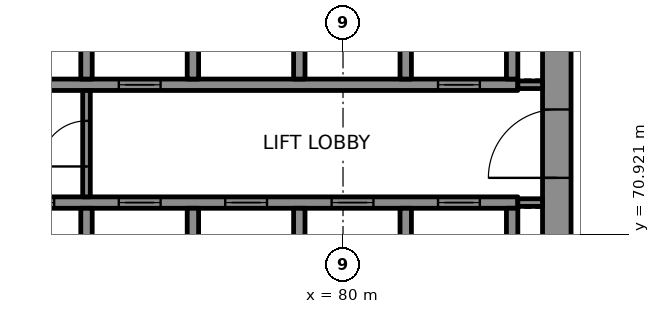
"""IFC4 building model, lengths in metres.
Left out: names, types, materials, properties, quantities, classifications, styles, units other than length and angle.
Written with IfcOpenShell. Run it as: python <this file> out.ifc"""

import sys

from ifc_helpers import new_model, si_unit, direction, frame, frame_2d, origin, place, context, subcontext, project, spatial, rectangle, extrude, element, fill, save


model = new_model("IFC4")
c1 = context("Model", 3, precision=1e-05, world=origin(), true_north=direction((0.0, 1.0)))
c2 = subcontext(c1, "Body", "Model", "MODEL_VIEW")
j1 = project(units=[si_unit("LENGTHUNIT", "METRE"), si_unit("PLANEANGLEUNIT", "RADIAN")], contexts=[c1])
p1 = place(None, origin())
s1 = spatial("IfcSite", under=j1, at=p1, CompositionType="ELEMENT")
p2 = place(p1, origin())
s2 = spatial("IfcBuilding", under=s1, at=p2, CompositionType="ELEMENT")
p3 = place(p2, frame((0.0, 0.0, 214.3)))
s3 = spatial("IfcBuildingStorey", under=s2, at=p3, CompositionType="ELEMENT", Elevation=214.3)
p4 = place(p3, frame((85.625, 67.75, 0.0), z_axis=(0.0, 0.0, 1.0), x_axis=(0.0, 1.0, 0.0)))
e1 = element("IfcWall", 1, at=p4, inside=s3, PredefinedType="SHEAR", context=c2, shape_type="SweptSolid", body=[
    extrude(rectangle(XDim=14.5, YDim=0.75, at=frame_2d((7.25, 0.0))), origin(), (0.0, 0.0, 1.0), 3.7),
])
p5 = place(p4, frame((4.65, 0.0, 0.0)))
e2 = element("IfcOpeningElement", 2, at=p5, cuts=e1, PredefinedType="OPENING", context=c2, shape_type="SweptSolid", body=[
    extrude(rectangle(XDim=1.8, YDim=2.1, at=frame_2d((0.9, 1.05))), frame((0.0, 0.385, 0.0), z_axis=(0.0, -1.0, 0.0), x_axis=(1.0, 0.0, 0.0)), (0.0, 0.0, 1.0), 0.77),
])
p6 = place(p4, frame((11.8, 0.0, 0.0)))
e3 = element("IfcOpeningElement", 3, at=p6, cuts=e1, PredefinedType="OPENING", context=c2, shape_type="SweptSolid", body=[
    extrude(rectangle(XDim=0.9, YDim=2.1, at=frame_2d((0.45, 1.05))), frame((0.0, 0.385, 0.0), z_axis=(0.0, -1.0, 0.0), x_axis=(1.0, 0.0, 0.0)), (0.0, 0.0, 1.0), 0.77),
])
p7 = place(p3, frame((70.3, 71.75, 0.0), z_axis=(0.0, 0.0, 1.0), x_axis=(1.0, 0.0, 0.0)))
e4 = element("IfcWall", 4, at=p7, inside=s3, PredefinedType="SHEAR", context=c2, shape_type="SweptSolid", body=[
    extrude(rectangle(XDim=14.3, YDim=0.3, at=frame_2d((7.15, 0.0))), origin(), (0.0, 0.0, 1.0), 3.7),
])
p8 = place(p7, frame((1.0, 0.0, 0.0)))
e5 = element("IfcOpeningElement", 5, at=p8, cuts=e4, PredefinedType="OPENING", context=c2, shape_type="SweptSolid", body=[
    extrude(rectangle(XDim=1.1, YDim=2.1, at=frame_2d((0.55, 1.05))), frame((0.0, 0.16, 0.0), z_axis=(0.0, -1.0, 0.0), x_axis=(1.0, 0.0, 0.0)), (0.0, 0.0, 1.0), 0.32),
])
p9 = place(p7, frame((3.8, 0.0, 0.0)))
e6 = element("IfcOpeningElement", 6, at=p9, cuts=e4, PredefinedType="OPENING", context=c2, shape_type="SweptSolid", body=[
    extrude(rectangle(XDim=1.1, YDim=2.1, at=frame_2d((0.55, 1.05))), frame((0.0, 0.16, 0.0), z_axis=(0.0, -1.0, 0.0), x_axis=(1.0, 0.0, 0.0)), (0.0, 0.0, 1.0), 0.32),
])
p10 = place(p7, frame((6.6, 0.0, 0.0)))
e7 = element("IfcOpeningElement", 7, at=p10, cuts=e4, PredefinedType="OPENING", context=c2, shape_type="SweptSolid", body=[
    extrude(rectangle(XDim=1.1, YDim=2.1, at=frame_2d((0.55, 1.05))), frame((0.0, 0.16, 0.0), z_axis=(0.0, -1.0, 0.0), x_axis=(1.0, 0.0, 0.0)), (0.0, 0.0, 1.0), 0.32),
])
p11 = place(p7, frame((9.4, 0.0, 0.0)))
e8 = element("IfcOpeningElement", 8, at=p11, cuts=e4, PredefinedType="OPENING", context=c2, shape_type="SweptSolid", body=[
    extrude(rectangle(XDim=1.1, YDim=2.1, at=frame_2d((0.55, 1.05))), frame((0.0, 0.16, 0.0), z_axis=(0.0, -1.0, 0.0), x_axis=(1.0, 0.0, 0.0)), (0.0, 0.0, 1.0), 0.32),
])
p12 = place(p7, frame((12.2, 0.0, 0.0)))
e9 = element("IfcOpeningElement", 9, at=p12, cuts=e4, PredefinedType="OPENING", context=c2, shape_type="SweptSolid", body=[
    extrude(rectangle(XDim=1.1, YDim=2.1, at=frame_2d((0.55, 1.05))), frame((0.0, 0.16, 0.0), z_axis=(0.0, -1.0, 0.0), x_axis=(1.0, 0.0, 0.0)), (0.0, 0.0, 1.0), 0.32),
])
p13 = place(p3, frame((70.3, 74.85, 0.0), z_axis=(0.0, 0.0, 1.0), x_axis=(1.0, 0.0, 0.0)))
e10 = element("IfcWall", 10, at=p13, inside=s3, PredefinedType="SHEAR", context=c2, shape_type="SweptSolid", body=[
    extrude(rectangle(XDim=14.3, YDim=0.3, at=frame_2d((7.15, 0.0))), origin(), (0.0, 0.0, 1.0), 3.7),
])
p14 = place(p13, frame((3.8, 0.0, 0.0)))
e11 = element("IfcOpeningElement", 11, at=p14, cuts=e10, PredefinedType="OPENING", context=c2, shape_type="SweptSolid", body=[
    extrude(rectangle(XDim=1.1, YDim=2.1, at=frame_2d((0.55, 1.05))), frame((0.0, 0.16, 0.0), z_axis=(0.0, -1.0, 0.0), x_axis=(1.0, 0.0, 0.0)), (0.0, 0.0, 1.0), 0.32),
])
p15 = place(p13, frame((12.2, 0.0, 0.0)))
e12 = element("IfcOpeningElement", 12, at=p15, cuts=e10, PredefinedType="OPENING", context=c2, shape_type="SweptSolid", body=[
    extrude(rectangle(XDim=1.1, YDim=2.1, at=frame_2d((0.55, 1.05))), frame((0.0, 0.16, 0.0), z_axis=(0.0, -1.0, 0.0), x_axis=(1.0, 0.0, 0.0)), (0.0, 0.0, 1.0), 0.32),
])
for number, where, z_axis, x_axis in (
    (13, (73.25, 69.0, 0.0), (0.0, 0.0, 1.0), (0.0, 1.0, 0.0)),
    (14, (73.25, 75.0, 0.0), (0.0, 0.0, 1.0), (0.0, 1.0, 0.0)),
    (15, (76.05, 69.0, 0.0), (0.0, 0.0, 1.0), (0.0, 1.0, 0.0)),
    (16, (76.05, 75.0, 0.0), (0.0, 0.0, 1.0), (0.0, 1.0, 0.0)),
    (17, (78.85, 69.0, 0.0), (0.0, 0.0, 1.0), (0.0, 1.0, 0.0)),
    (18, (78.85, 75.0, 0.0), (0.0, 0.0, 1.0), (0.0, 1.0, 0.0)),
    (19, (81.65, 69.0, 0.0), (0.0, 0.0, 1.0), (0.0, 1.0, 0.0)),
    (20, (81.65, 75.0, 0.0), (0.0, 0.0, 1.0), (0.0, 1.0, 0.0)),
    (21, (84.45, 69.0, 0.0), (0.0, 0.0, 1.0), (0.0, 1.0, 0.0)),
    (22, (84.45, 75.0, 0.0), (0.0, 0.0, 1.0), (0.0, 1.0, 0.0)),
):
    element("IfcWall", number, at=place(p3, frame(where, z_axis=z_axis, x_axis=x_axis)), inside=s3, PredefinedType="SHEAR", context=c2, shape_type="SweptSolid", body=[
        extrude(rectangle(XDim=2.6, YDim=0.3, at=frame_2d((1.3, 0.0))), origin(), (0.0, 0.0, 1.0), 3.7),
    ])
for number, where, z_axis, x_axis in (
    (23, (84.6, 71.75, 0.0), (0.0, 0.0, 1.0), (1.0, 0.0, 0.0)),
    (24, (84.6, 74.85, 0.0), (0.0, 0.0, 1.0), (1.0, 0.0, 0.0)),
):
    element("IfcWall", number, at=place(p3, frame(where, z_axis=z_axis, x_axis=x_axis)), inside=s3, PredefinedType="PARTITIONING", context=c2, shape_type="SweptSolid", body=[
        extrude(rectangle(XDim=0.65, YDim=0.2, at=frame_2d((0.325, 0.0))), origin(), (0.0, 0.0, 1.0), 3.7),
    ])
p16 = place(p3, frame((73.25, 71.9, 0.0), z_axis=(0.0, 0.0, 1.0), x_axis=(0.0, 1.0, 0.0)))
e25 = element("IfcWall", 25, at=p16, inside=s3, PredefinedType="PARTITIONING", context=c2, shape_type="SweptSolid", body=[
    extrude(rectangle(XDim=2.8, YDim=0.2, at=frame_2d((1.4, 0.0))), origin(), (0.0, 0.0, 1.0), 3.7),
])
p17 = place(p16, frame((0.8, 0.0, 0.0)))
e26 = element("IfcOpeningElement", 26, at=p17, cuts=e25, PredefinedType="OPENING", context=c2, shape_type="SweptSolid", body=[
    extrude(rectangle(XDim=1.2, YDim=2.1, at=frame_2d((0.6, 1.05))), frame((0.0, 0.11, 0.0), z_axis=(0.0, -1.0, 0.0), x_axis=(1.0, 0.0, 0.0)), (0.0, 0.0, 1.0), 0.22),
])
p18 = place(p8, origin())
e27 = element("IfcDoor", 27, at=p18, inside=s3, OperationType="DOUBLE_DOOR_SLIDING", PredefinedType="DOOR", context=c2, shape_type="SweptSolid", body=[
    extrude(rectangle(XDim=1.1, YDim=2.1, at=frame_2d((0.55, 1.05))), frame((0.0, 0.025, 0.0), z_axis=(0.0, -1.0, 0.0), x_axis=(1.0, 0.0, 0.0)), (0.0, 0.0, 1.0), 0.05),
])
fill(e5, e27)
p19 = place(p9, origin())
e28 = element("IfcDoor", 28, at=p19, inside=s3, OperationType="DOUBLE_DOOR_SLIDING", PredefinedType="DOOR", context=c2, shape_type="SweptSolid", body=[
    extrude(rectangle(XDim=1.1, YDim=2.1, at=frame_2d((0.55, 1.05))), frame((0.0, 0.025, 0.0), z_axis=(0.0, -1.0, 0.0), x_axis=(1.0, 0.0, 0.0)), (0.0, 0.0, 1.0), 0.05),
])
fill(e6, e28)
p20 = place(p10, origin())
e29 = element("IfcDoor", 29, at=p20, inside=s3, OperationType="DOUBLE_DOOR_SLIDING", PredefinedType="DOOR", context=c2, shape_type="SweptSolid", body=[
    extrude(rectangle(XDim=1.1, YDim=2.1, at=frame_2d((0.55, 1.05))), frame((0.0, 0.025, 0.0), z_axis=(0.0, -1.0, 0.0), x_axis=(1.0, 0.0, 0.0)), (0.0, 0.0, 1.0), 0.05),
])
fill(e7, e29)
p21 = place(p11, origin())
e30 = element("IfcDoor", 30, at=p21, inside=s3, OperationType="DOUBLE_DOOR_SLIDING", PredefinedType="DOOR", context=c2, shape_type="SweptSolid", body=[
    extrude(rectangle(XDim=1.1, YDim=2.1, at=frame_2d((0.55, 1.05))), frame((0.0, 0.025, 0.0), z_axis=(0.0, -1.0, 0.0), x_axis=(1.0, 0.0, 0.0)), (0.0, 0.0, 1.0), 0.05),
])
fill(e8, e30)
p22 = place(p12, origin())
e31 = element("IfcDoor", 31, at=p22, inside=s3, OperationType="DOUBLE_DOOR_SLIDING", PredefinedType="DOOR", context=c2, shape_type="SweptSolid", body=[
    extrude(rectangle(XDim=1.1, YDim=2.1, at=frame_2d((0.55, 1.05))), frame((0.0, 0.025, 0.0), z_axis=(0.0, -1.0, 0.0), x_axis=(1.0, 0.0, 0.0)), (0.0, 0.0, 1.0), 0.05),
])
fill(e9, e31)
p23 = place(p14, origin())
e32 = element("IfcDoor", 32, at=p23, inside=s3, OperationType="DOUBLE_DOOR_SLIDING", PredefinedType="DOOR", context=c2, shape_type="SweptSolid", body=[
    extrude(rectangle(XDim=1.1, YDim=2.1, at=frame_2d((0.55, 1.05))), frame((0.0, 0.025, 0.0), z_axis=(0.0, -1.0, 0.0), x_axis=(1.0, 0.0, 0.0)), (0.0, 0.0, 1.0), 0.05),
])
fill(e11, e32)
p24 = place(p15, origin())
e33 = element("IfcDoor", 33, at=p24, inside=s3, OperationType="DOUBLE_DOOR_SLIDING", PredefinedType="DOOR", context=c2, shape_type="SweptSolid", body=[
    extrude(rectangle(XDim=1.1, YDim=2.1, at=frame_2d((0.55, 1.05))), frame((0.0, 0.025, 0.0), z_axis=(0.0, -1.0, 0.0), x_axis=(1.0, 0.0, 0.0)), (0.0, 0.0, 1.0), 0.05),
])
fill(e12, e33)
p25 = place(p17, origin())
e34 = element("IfcDoor", 34, at=p25, inside=s3, OperationType="SINGLE_SWING_LEFT", PredefinedType="DOOR", context=c2, shape_type="SweptSolid", body=[
    extrude(rectangle(XDim=1.2, YDim=2.1, at=frame_2d((0.6, 1.05))), frame((0.0, 0.025, 0.0), z_axis=(0.0, -1.0, 0.0), x_axis=(1.0, 0.0, 0.0)), (0.0, 0.0, 1.0), 0.05),
])
fill(e26, e34)
p26 = place(p5, origin())
e35 = element("IfcDoor", 35, at=p26, inside=s3, OperationType="SINGLE_SWING_RIGHT", PredefinedType="DOOR", context=c2, shape_type="SweptSolid", body=[
    extrude(rectangle(XDim=1.8, YDim=2.1, at=frame_2d((0.9, 1.05))), frame((0.0, 0.095, 0.0), z_axis=(0.0, -1.0, 0.0), x_axis=(1.0, 0.0, 0.0)), (0.0, 0.0, 1.0), 0.19),
])
fill(e2, e35)
save(model, sys.argv[1])
